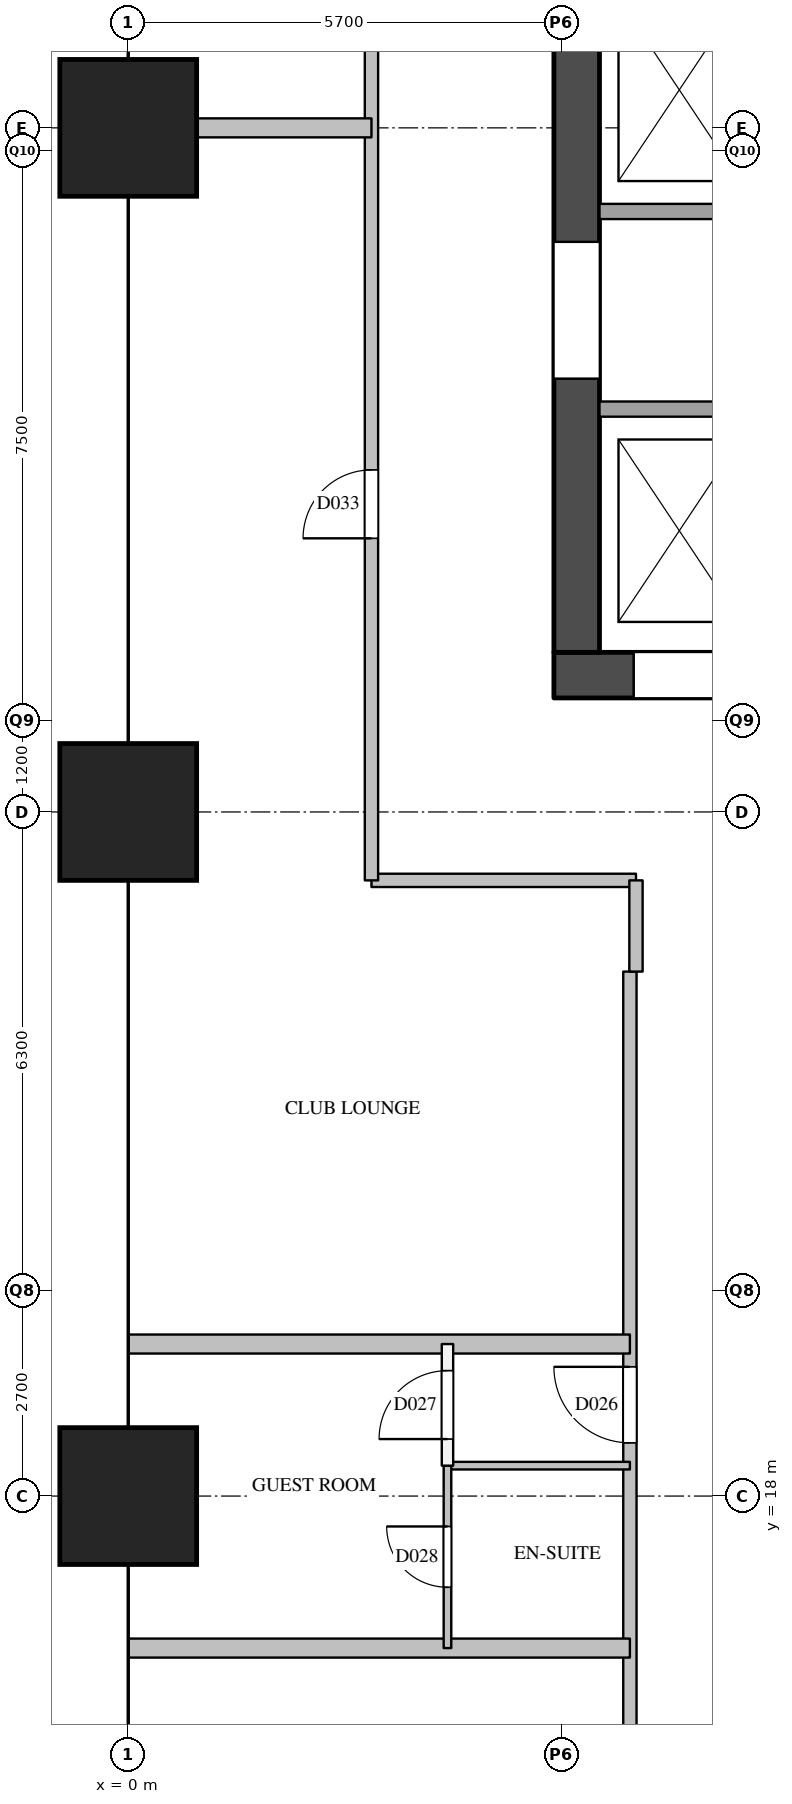
"""IFC4 building model, lengths in metres.
Left out: names, types, materials, properties, quantities, classifications, styles, units other than length and angle.
Written with IfcOpenShell. Run it as: python <this file> out.ifc"""

import sys

from ifc_helpers import new_model, si_unit, direction, frame, frame_2d, origin, origin_2d, place, context, subcontext, project, spatial, rectangle, extrude, element, fill, save


model = new_model("IFC4")
c1 = context("Model", 3, precision=1e-05, world=origin(), true_north=direction((0.0, 1.0)))
c2 = subcontext(c1, "Body", "Model", "MODEL_VIEW")
j1 = project(units=[si_unit("LENGTHUNIT", "METRE"), si_unit("PLANEANGLEUNIT", "RADIAN")], contexts=[c1])
p1 = place(None, origin())
s1 = spatial("IfcSite", under=j1, at=p1, CompositionType="ELEMENT")
p2 = place(p1, origin())
s2 = spatial("IfcBuilding", under=s1, at=p2, CompositionType="ELEMENT")
p3 = place(p2, frame((0.0, 0.0, 38.6)))
s3 = spatial("IfcBuildingStorey", under=s2, at=p3, CompositionType="ELEMENT", Elevation=38.6)
for number, where, z_axis, x_axis in (
    (1, (0.0, 18.0, 0.0), (0.0, 0.0, 1.0), (1.0, 0.0, 0.0)),
    (2, (0.0, 27.0, 0.0), (0.0, 0.0, 1.0), (1.0, 0.0, 0.0)),
    (3, (0.0, 36.0, 0.0), (0.0, 0.0, 1.0), (1.0, 0.0, 0.0)),
):
    element("IfcColumn", number, at=place(p3, frame(where, z_axis=z_axis, x_axis=x_axis)), inside=s3, PredefinedType="COLUMN", context=c2, shape_type="SweptSolid", body=[
        extrude(rectangle(XDim=1.8, YDim=1.8, at=origin_2d()), origin(), (0.0, 0.0, 1.0), 3.8),
    ])
p4 = place(p3, frame((5.6, 28.8, 0.0), z_axis=(0.0, 0.0, 1.0), x_axis=(1.0, 0.0, 0.0)))
e4 = element("IfcWall", 4, at=p4, inside=s3, PredefinedType="SHEAR", context=c2, shape_type="SweptSolid", body=[
    extrude(rectangle(XDim=12.4, YDim=0.6, at=frame_2d((6.2, 0.0))), origin(), (0.0, 0.0, 1.0), 3.5),
])
p5 = place(p4, frame((1.05, 0.0, 0.0)))
e5 = element("IfcOpeningElement", 5, at=p5, cuts=e4, PredefinedType="OPENING", context=c2, shape_type="SweptSolid", body=[
    extrude(rectangle(XDim=1.2, YDim=2.1, at=frame_2d((0.6, 1.05))), frame((0.0, 0.31, 0.0), z_axis=(0.0, -1.0, 0.0), x_axis=(1.0, 0.0, 0.0)), (0.0, 0.0, 1.0), 0.62),
])
p6 = place(p4, frame((5.25, 0.0, 0.0)))
e6 = element("IfcOpeningElement", 6, at=p6, cuts=e4, PredefinedType="OPENING", context=c2, shape_type="SweptSolid", body=[
    extrude(rectangle(XDim=1.2, YDim=2.1, at=frame_2d((0.6, 1.05))), frame((0.0, 0.31, 0.0), z_axis=(0.0, -1.0, 0.0), x_axis=(1.0, 0.0, 0.0)), (0.0, 0.0, 1.0), 0.62),
])
p7 = place(p4, frame((7.35, 0.0, 0.0)))
e7 = element("IfcOpeningElement", 7, at=p7, cuts=e4, PredefinedType="OPENING", context=c2, shape_type="SweptSolid", body=[
    extrude(rectangle(XDim=1.2, YDim=2.1, at=frame_2d((0.6, 1.05))), frame((0.0, 0.31, 0.0), z_axis=(0.0, -1.0, 0.0), x_axis=(1.0, 0.0, 0.0)), (0.0, 0.0, 1.0), 0.62),
])
p8 = place(p3, frame((5.9, 29.1, 0.0), z_axis=(0.0, 0.0, 1.0), x_axis=(0.0, 1.0, 0.0)))
e8 = element("IfcWall", 8, at=p8, inside=s3, PredefinedType="SHEAR", context=c2, shape_type="SweptSolid", body=[
    extrude(rectangle(XDim=20.3, YDim=0.6, at=frame_2d((10.15, 0.0))), origin(), (0.0, 0.0, 1.0), 3.5),
])
p9 = place(p8, frame((3.6, 0.0, 0.0)))
e9 = element("IfcOpeningElement", 9, at=p9, cuts=e8, PredefinedType="OPENING", context=c2, shape_type="SweptSolid", body=[
    extrude(rectangle(XDim=1.8, YDim=2.1, at=frame_2d((0.9, 1.05))), frame((0.0, 0.31, 0.0), z_axis=(0.0, -1.0, 0.0), x_axis=(1.0, 0.0, 0.0)), (0.0, 0.0, 1.0), 0.62),
])
p10 = place(p8, frame((16.4, 0.0, 0.0)))
e10 = element("IfcOpeningElement", 10, at=p10, cuts=e8, PredefinedType="OPENING", context=c2, shape_type="SweptSolid", body=[
    extrude(rectangle(XDim=1.0, YDim=2.1, at=frame_2d((0.5, 1.05))), frame((0.0, 0.31, 0.0), z_axis=(0.0, -1.0, 0.0), x_axis=(1.0, 0.0, 0.0)), (0.0, 0.0, 1.0), 0.62),
])
p11 = place(p3, frame((6.2, 32.3, 0.0), z_axis=(0.0, 0.0, 1.0), x_axis=(1.0, 0.0, 0.0)))
e11 = element("IfcWall", 11, at=p11, inside=s3, PredefinedType="SOLIDWALL", context=c2, shape_type="SweptSolid", body=[
    extrude(rectangle(XDim=11.2, YDim=0.2, at=frame_2d((5.6, 0.0))), origin(), (0.0, 0.0, 1.0), 3.5),
])
p12 = place(p11, frame((2.55, 0.0, 0.0)))
e12 = element("IfcOpeningElement", 12, at=p12, cuts=e11, PredefinedType="OPENING", context=c2, shape_type="SweptSolid", body=[
    extrude(rectangle(XDim=1.2, YDim=2.1, at=frame_2d((0.6, 1.05))), frame((0.0, 0.11, 0.0), z_axis=(0.0, -1.0, 0.0), x_axis=(1.0, 0.0, 0.0)), (0.0, 0.0, 1.0), 0.22),
])
p13 = place(p3, frame((6.2, 34.9, 0.0), z_axis=(0.0, 0.0, 1.0), x_axis=(1.0, 0.0, 0.0)))
e13 = element("IfcWall", 13, at=p13, inside=s3, PredefinedType="SOLIDWALL", context=c2, shape_type="SweptSolid", body=[
    extrude(rectangle(XDim=11.2, YDim=0.2, at=frame_2d((5.6, 0.0))), origin(), (0.0, 0.0, 1.0), 3.5),
])
p14 = place(p3, frame((6.6, 24.9, 0.0), z_axis=(0.0, 0.0, 1.0), x_axis=(1.0, 0.0, 0.0)))
e14 = element("IfcWall", 14, at=p14, inside=s3, PredefinedType="PARTITIONING", context=c2, shape_type="SweptSolid", body=[
    extrude(rectangle(XDim=0.08, YDim=0.175, at=frame_2d((0.04, 0.0))), origin(), (0.0, 0.0, 1.0), 3.5),
])
p15 = place(p3, frame((3.2, 26.1, 0.0), z_axis=(0.0, 0.0, 1.0), x_axis=(1.0, 0.0, 0.0)))
e15 = element("IfcWall", 15, at=p15, inside=s3, PredefinedType="PARTITIONING", context=c2, shape_type="SweptSolid", body=[
    extrude(rectangle(XDim=3.48, YDim=0.175, at=frame_2d((1.74, 0.0))), origin(), (0.0, 0.0, 1.0), 3.5),
])
p16 = place(p3, frame((3.2, 26.1, 0.0), z_axis=(0.0, 0.0, 1.0), x_axis=(0.0, 1.0, 0.0)))
e16 = element("IfcWall", 16, at=p16, inside=s3, PredefinedType="PARTITIONING", context=c2, shape_type="SweptSolid", body=[
    extrude(rectangle(XDim=26.3, YDim=0.175, at=frame_2d((13.15, 0.0))), origin(), (0.0, 0.0, 1.0), 2.5),
])
p17 = place(p16, frame((4.5, 0.0, 0.0)))
e17 = element("IfcOpeningElement", 17, at=p17, cuts=e16, PredefinedType="OPENING", context=c2, shape_type="SweptSolid", body=[
    extrude(rectangle(XDim=0.9, YDim=2.1, at=frame_2d((0.45, 1.05))), frame((0.0, 0.097, 0.0), z_axis=(0.0, -1.0, 0.0), x_axis=(1.0, 0.0, 0.0)), (0.0, 0.0, 1.0), 0.195),
])
p18 = place(p16, frame((17.65, 0.0, 0.0)))
e18 = element("IfcOpeningElement", 18, at=p18, cuts=e16, PredefinedType="OPENING", context=c2, shape_type="SweptSolid", body=[
    extrude(rectangle(XDim=0.9, YDim=2.1, at=frame_2d((0.45, 1.05))), frame((0.0, 0.097, 0.0), z_axis=(0.0, -1.0, 0.0), x_axis=(1.0, 0.0, 0.0)), (0.0, 0.0, 1.0), 0.195),
])
p19 = place(p3, frame((6.6, 6.6, 0.0), z_axis=(0.0, 0.0, 1.0), x_axis=(0.0, 1.0, 0.0)))
e19 = element("IfcWall", 19, at=p19, inside=s3, PredefinedType="PARTITIONING", context=c2, shape_type="SweptSolid", body=[
    extrude(rectangle(XDim=18.3, YDim=0.175, at=frame_2d((9.15, 0.0))), origin(), (0.0, 0.0, 1.0), 3.5),
])
p20 = place(p19, frame((4.25, 0.0, 0.0)))
e20 = element("IfcOpeningElement", 20, at=p20, cuts=e19, PredefinedType="OPENING", context=c2, shape_type="SweptSolid", body=[
    extrude(rectangle(XDim=0.9, YDim=2.1, at=frame_2d((0.45, 1.05))), frame((0.0, 0.097, 0.0), z_axis=(0.0, -1.0, 0.0), x_axis=(1.0, 0.0, 0.0)), (0.0, 0.0, 1.0), 0.195),
])
p21 = place(p19, frame((12.1, 0.0, 0.0)))
e21 = element("IfcOpeningElement", 21, at=p21, cuts=e19, PredefinedType="OPENING", context=c2, shape_type="SweptSolid", body=[
    extrude(rectangle(XDim=1.0, YDim=2.1, at=frame_2d((0.5, 1.05))), frame((0.0, 0.097, 0.0), z_axis=(0.0, -1.0, 0.0), x_axis=(1.0, 0.0, 0.0)), (0.0, 0.0, 1.0), 0.195),
])
p22 = place(p3, frame((6.68, 24.9, 0.0), z_axis=(0.0, 0.0, 1.0), x_axis=(0.0, 1.0, 0.0)))
e22 = element("IfcWall", 22, at=p22, inside=s3, PredefinedType="PARTITIONING", context=c2, shape_type="SweptSolid", body=[
    extrude(rectangle(XDim=1.2, YDim=0.175, at=frame_2d((0.6, 0.0))), origin(), (0.0, 0.0, 1.0), 3.5),
])
p23 = place(p3, frame((4.2, 18.4, 0.0), z_axis=(0.0, 0.0, 1.0), x_axis=(0.0, 1.0, 0.0)))
e23 = element("IfcWall", 23, at=p23, inside=s3, PredefinedType="PARTITIONING", context=c2, shape_type="SweptSolid", body=[
    extrude(rectangle(XDim=1.6, YDim=0.15, at=frame_2d((0.8, 0.0))), origin(), (0.0, 0.0, 1.0), 3.5),
])
p24 = place(p23, frame((0.35, 0.0, 0.0)))
e24 = element("IfcOpeningElement", 24, at=p24, cuts=e23, PredefinedType="OPENING", context=c2, shape_type="SweptSolid", body=[
    extrude(rectangle(XDim=0.9, YDim=2.1, at=frame_2d((0.45, 1.05))), frame((0.0, 0.085, 0.0), z_axis=(0.0, -1.0, 0.0), x_axis=(1.0, 0.0, 0.0)), (0.0, 0.0, 1.0), 0.17),
])
for number, where, z_axis, x_axis in (
    (25, (0.0, 16.0, 0.0), (0.0, 0.0, 1.0), (1.0, 0.0, 0.0)),
    (26, (0.0, 20.0, 0.0), (0.0, 0.0, 1.0), (1.0, 0.0, 0.0)),
):
    element("IfcWall", number, at=place(p3, frame(where, z_axis=z_axis, x_axis=x_axis)), inside=s3, PredefinedType="PARTITIONING", context=c2, shape_type="SweptSolid", body=[
        extrude(rectangle(XDim=6.6, YDim=0.25, at=frame_2d((3.3, 0.0))), origin(), (0.0, 0.0, 1.0), 2.5),
    ])
p25 = place(p3, frame((0.0, 36.0, 0.0), z_axis=(0.0, 0.0, 1.0), x_axis=(1.0, 0.0, 0.0)))
e27 = element("IfcWall", 27, at=p25, inside=s3, PredefinedType="PARTITIONING", context=c2, shape_type="SweptSolid", body=[
    extrude(rectangle(XDim=3.2, YDim=0.25, at=frame_2d((1.6, 0.0))), origin(), (0.0, 0.0, 1.0), 3.5),
])
p26 = place(p3, frame((4.2, 18.4, 0.0), z_axis=(0.0, 0.0, 1.0), x_axis=(1.0, 0.0, 0.0)))
e28 = element("IfcWall", 28, at=p26, inside=s3, PredefinedType="PARTITIONING", context=c2, shape_type="SweptSolid", body=[
    extrude(rectangle(XDim=2.4, YDim=0.1, at=frame_2d((1.2, 0.0))), origin(), (0.0, 0.0, 1.0), 3.5),
])
p27 = place(p3, frame((4.2, 16.0, 0.0), z_axis=(0.0, 0.0, 1.0), x_axis=(0.0, 1.0, 0.0)))
e29 = element("IfcWall", 29, at=p27, inside=s3, PredefinedType="PARTITIONING", context=c2, shape_type="SweptSolid", body=[
    extrude(rectangle(XDim=2.4, YDim=0.1, at=frame_2d((1.2, 0.0))), origin(), (0.0, 0.0, 1.0), 3.5),
])
p28 = place(p27, frame((0.8, 0.0, 0.0)))
e30 = element("IfcOpeningElement", 30, at=p28, cuts=e29, PredefinedType="OPENING", context=c2, shape_type="SweptSolid", body=[
    extrude(rectangle(XDim=0.8, YDim=2.1, at=frame_2d((0.4, 1.05))), frame((0.0, 0.06, 0.0), z_axis=(0.0, -1.0, 0.0), x_axis=(1.0, 0.0, 0.0)), (0.0, 0.0, 1.0), 0.12),
])
p29 = place(p5, origin())
e31 = element("IfcDoor", 31, at=p29, inside=s3, OperationType="SLIDING_TO_LEFT", PredefinedType="DOOR", context=c2, shape_type="SweptSolid", body=[
    extrude(rectangle(XDim=1.2, YDim=2.1, at=frame_2d((0.6, 1.05))), frame((0.0, 0.025, 0.0), z_axis=(0.0, -1.0, 0.0), x_axis=(1.0, 0.0, 0.0)), (0.0, 0.0, 1.0), 0.05),
])
fill(e5, e31)
p30 = place(p9, origin())
e32 = element("IfcDoor", 32, at=p30, inside=s3, OperationType="DOUBLE_DOOR_SINGLE_SWING", PredefinedType="DOOR", context=c2, shape_type="SweptSolid", body=[
    extrude(rectangle(XDim=1.8, YDim=2.1, at=frame_2d((0.9, 1.05))), frame((0.0, 0.025, 0.0), z_axis=(0.0, -1.0, 0.0), x_axis=(1.0, 0.0, 0.0)), (0.0, 0.0, 1.0), 0.05),
])
fill(e9, e32)
p31 = place(p21, origin())
e33 = element("IfcDoor", 33, at=p31, inside=s3, OperationType="SINGLE_SWING_RIGHT", PredefinedType="DOOR", context=c2, shape_type="SweptSolid", body=[
    extrude(rectangle(XDim=1.0, YDim=2.1, at=frame_2d((0.5, 1.05))), frame((0.0, 0.025, 0.0), z_axis=(0.0, -1.0, 0.0), x_axis=(1.0, 0.0, 0.0)), (0.0, 0.0, 1.0), 0.05),
])
fill(e21, e33)
p32 = place(p24, origin())
e34 = element("IfcDoor", 34, at=p32, inside=s3, OperationType="SINGLE_SWING_LEFT", PredefinedType="DOOR", context=c2, shape_type="SweptSolid", body=[
    extrude(rectangle(XDim=0.9, YDim=2.1, at=frame_2d((0.45, 1.05))), frame((0.0, 0.025, 0.0), z_axis=(0.0, -1.0, 0.0), x_axis=(1.0, 0.0, 0.0)), (0.0, 0.0, 1.0), 0.05),
])
fill(e24, e34)
p33 = place(p28, origin())
e35 = element("IfcDoor", 35, at=p33, inside=s3, OperationType="SINGLE_SWING_RIGHT", PredefinedType="DOOR", context=c2, shape_type="SweptSolid", body=[
    extrude(rectangle(XDim=0.8, YDim=2.1, at=frame_2d((0.4, 1.05))), frame((0.0, 0.025, 0.0), z_axis=(0.0, -1.0, 0.0), x_axis=(1.0, 0.0, 0.0)), (0.0, 0.0, 1.0), 0.05),
])
fill(e30, e35)
p34 = place(p17, origin())
e36 = element("IfcDoor", 36, at=p34, inside=s3, OperationType="SINGLE_SWING_LEFT", PredefinedType="DOOR", context=c2, shape_type="SweptSolid", body=[
    extrude(rectangle(XDim=0.9, YDim=2.1, at=frame_2d((0.45, 1.05))), frame((0.0, 0.025, 0.0), z_axis=(0.0, -1.0, 0.0), x_axis=(1.0, 0.0, 0.0)), (0.0, 0.0, 1.0), 0.05),
])
fill(e17, e36)
save(model, sys.argv[1])
